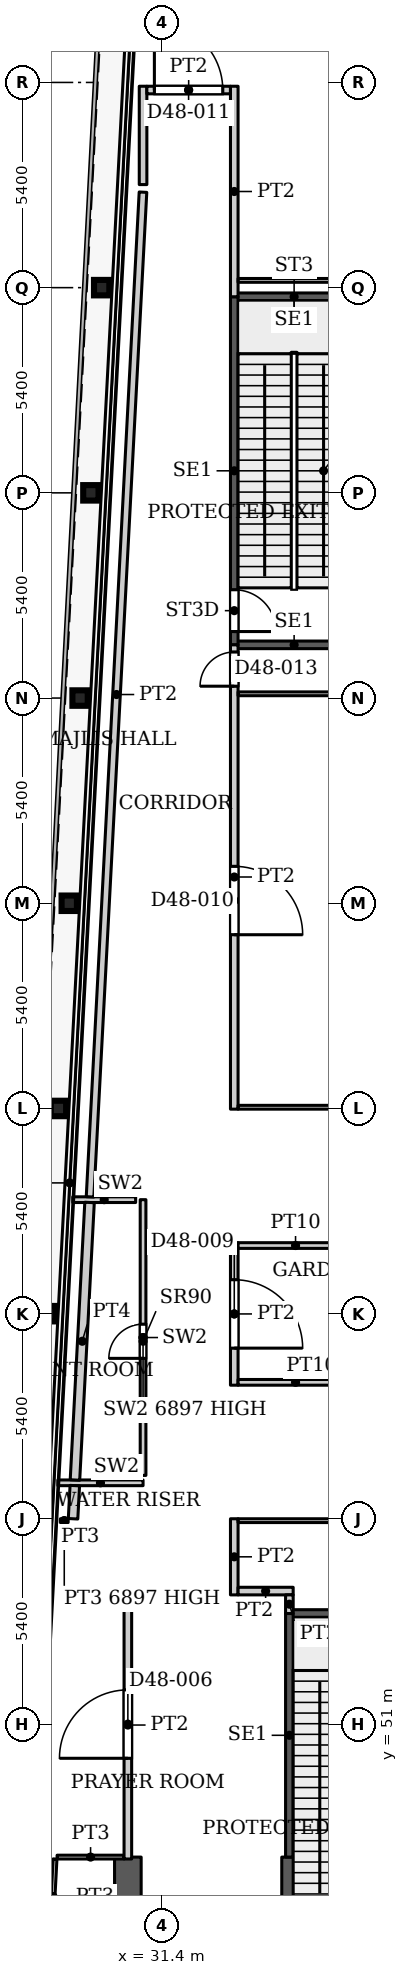
"""IFC4 building model, lengths in metres.
Left out: names, types, materials, properties, quantities, classifications, styles, units other than length and angle.
Written with IfcOpenShell. Run it as: python <this file> out.ifc"""

import sys

from ifc_helpers import new_model, si_unit, direction, frame, frame_2d, origin, origin_2d, place, context, subcontext, project, spatial, rectangle, i_section, extrude, source, transform, mapped, element, fill, save


model = new_model("IFC4")
c1 = context("Model", 3, precision=1e-05, world=origin(), true_north=direction((0.0, 1.0)))
c2 = subcontext(c1, "Body", "Model", "MODEL_VIEW")
j1 = project(units=[si_unit("LENGTHUNIT", "METRE"), si_unit("PLANEANGLEUNIT", "RADIAN")], contexts=[c1])
p1 = place(None, origin())
s1 = spatial("IfcSite", under=j1, at=p1, CompositionType="ELEMENT")
p2 = place(p1, origin())
s2 = spatial("IfcBuilding", under=s1, at=p2, CompositionType="ELEMENT")
p3 = place(p2, frame((0.0, 0.0, 203.3)))
s3 = spatial("IfcBuildingStorey", under=s2, at=p3, CompositionType="ELEMENT", Elevation=203.3)
for number, where, z_axis, x_axis in (
    (1, (28.39, 61.8, 0.0), (0.0, 0.0, 1.0), (1.0, 0.0, 0.0)),
    (2, (28.674, 67.2, 0.0), (0.0, 0.0, 1.0), (1.0, 0.0, 0.0)),
    (3, (28.958, 72.6, 0.0), (0.0, 0.0, 1.0), (1.0, 0.0, 0.0)),
    (4, (29.243, 78.0, 0.0), (0.0, 0.0, 1.0), (1.0, 0.0, 0.0)),
    (5, (29.527, 83.4, 0.0), (0.0, 0.0, 1.0), (1.0, 0.0, 0.0)),
    (6, (29.811, 88.8, 0.0), (0.0, 0.0, 1.0), (1.0, 0.0, 0.0)),
):
    element("IfcColumn", number, at=place(p3, frame(where, z_axis=z_axis, x_axis=x_axis)), inside=s3, PredefinedType="COLUMN", context=c2, shape_type="SweptSolid", body=[
        extrude(i_section(OverallWidth=0.404, OverallDepth=0.407, WebThickness=0.027, FlangeThickness=0.044, FilletRadius=0.012, at=origin_2d()), origin(), (0.0, 0.0, 1.0), 7.8),
    ])
p4 = place(p3, frame((34.75, 29.05, 0.0), z_axis=(0.0, 0.0, 1.0), x_axis=(0.0, 1.0, 0.0)))
e7 = element("IfcWall", 7, at=p4, inside=s3, PredefinedType="SHEAR", context=c2, shape_type="SweptSolid", body=[
    extrude(rectangle(XDim=18.45, YDim=0.4, at=frame_2d((9.225, 0.0))), origin(), (0.0, 0.0, 1.0), 7.8),
])
p5 = place(p4, frame((8.025, 0.0, 0.0)))
e8 = element("IfcOpeningElement", 8, at=p5, cuts=e7, PredefinedType="OPENING", context=c2, shape_type="SweptSolid", body=[
    extrude(rectangle(XDim=1.1, YDim=2.2, at=frame_2d((0.55, 1.1))), frame((0.0, 0.21, 0.0), z_axis=(0.0, -1.0, 0.0), x_axis=(1.0, 0.0, 0.0)), (0.0, 0.0, 1.0), 0.42),
])
p6 = place(p4, frame((10.875, 0.0, 0.0)))
e9 = element("IfcOpeningElement", 9, at=p6, cuts=e7, PredefinedType="OPENING", context=c2, shape_type="SweptSolid", body=[
    extrude(rectangle(XDim=1.1, YDim=2.2, at=frame_2d((0.55, 1.1))), frame((0.0, 0.21, 0.0), z_axis=(0.0, -1.0, 0.0), x_axis=(1.0, 0.0, 0.0)), (0.0, 0.0, 1.0), 0.42),
])
p7 = place(p4, frame((13.725, 0.0, 0.0)))
e10 = element("IfcOpeningElement", 10, at=p7, cuts=e7, PredefinedType="OPENING", context=c2, shape_type="SweptSolid", body=[
    extrude(rectangle(XDim=1.1, YDim=2.2, at=frame_2d((0.55, 1.1))), frame((0.0, 0.21, 0.0), z_axis=(0.0, -1.0, 0.0), x_axis=(1.0, 0.0, 0.0)), (0.0, 0.0, 1.0), 0.42),
])
p8 = place(p4, frame((15.95, 0.0, 0.0)))
e11 = element("IfcOpeningElement", 11, at=p8, cuts=e7, PredefinedType="OPENING", context=c2, shape_type="SweptSolid", body=[
    extrude(rectangle(XDim=1.1, YDim=2.2, at=frame_2d((0.55, 1.1))), frame((0.0, 0.21, 0.0), z_axis=(0.0, -1.0, 0.0), x_axis=(1.0, 0.0, 0.0)), (0.0, 0.0, 1.0), 0.42),
])
p9 = place(p3, frame((30.5, 29.05, 0.0), z_axis=(0.0, 0.0, 1.0), x_axis=(0.0, 1.0, 0.0)))
e12 = element("IfcWall", 12, at=p9, inside=s3, PredefinedType="SHEAR", context=c2, shape_type="SweptSolid", body=[
    extrude(rectangle(XDim=18.45, YDim=0.7, at=frame_2d((9.225, 0.0))), origin(), (0.0, 0.0, 1.0), 7.8),
])
p10 = place(p9, frame((1.34, 0.0, 0.0)))
e13 = element("IfcOpeningElement", 13, at=p10, cuts=e12, PredefinedType="OPENING", context=c2, shape_type="SweptSolid", body=[
    extrude(rectangle(XDim=0.9, YDim=2.2, at=frame_2d((0.45, 1.1))), frame((0.0, 0.36, 0.0), z_axis=(0.0, -1.0, 0.0), x_axis=(1.0, 0.0, 0.0)), (0.0, 0.0, 1.0), 0.72),
])
p11 = place(p9, frame((7.925, 0.0, 0.0)))
e14 = element("IfcOpeningElement", 14, at=p11, cuts=e12, PredefinedType="OPENING", context=c2, shape_type="SweptSolid", body=[
    extrude(rectangle(XDim=0.9, YDim=2.2, at=frame_2d((0.45, 1.1))), frame((0.0, 0.36, 0.0), z_axis=(0.0, -1.0, 0.0), x_axis=(1.0, 0.0, 0.0)), (0.0, 0.0, 1.0), 0.72),
])
p12 = place(p3, frame((34.75, 53.91, 0.0), z_axis=(0.0, 0.0, 1.0), x_axis=(1.0, 0.0, 0.0)))
e15 = element("IfcWall", 15, at=p12, inside=s3, PredefinedType="SHEAR", context=c2, shape_type="SweptSolid", body=[
    extrude(rectangle(XDim=3.15, YDim=0.2, at=frame_2d((1.575, 0.0))), origin(), (0.0, 0.0, 1.0), 7.8),
])
p13 = place(p3, frame((34.75, 47.5, 0.0), z_axis=(0.0, 0.0, 1.0), x_axis=(0.0, 1.0, 0.0)))
e16 = element("IfcWall", 16, at=p13, inside=s3, PredefinedType="SHEAR", context=c2, shape_type="SweptSolid", body=[
    extrude(rectangle(XDim=6.41, YDim=0.2, at=frame_2d((3.205, 0.0))), origin(), (0.0, 0.0, 1.0), 7.8),
])
for number, where, z_axis, x_axis in (
    (17, (33.3, 79.4, 0.0), (0.0, 0.0, 1.0), (1.0, 0.0, 0.0)),
    (18, (33.3, 88.56, 0.0), (0.0, 0.0, 1.0), (1.0, 0.0, 0.0)),
):
    element("IfcWall", number, at=place(p3, frame(where, z_axis=z_axis, x_axis=x_axis)), inside=s3, PredefinedType="SHEAR", context=c2, shape_type="SweptSolid", body=[
        extrude(rectangle(XDim=3.15, YDim=0.2, at=frame_2d((1.575, 0.0))), origin(), (0.0, 0.0, 1.0), 7.8),
    ])
p14 = place(p3, frame((33.3, 79.4, 0.0), z_axis=(0.0, 0.0, 1.0), x_axis=(0.0, 1.0, 0.0)))
e19 = element("IfcWall", 19, at=p14, inside=s3, PredefinedType="SHEAR", context=c2, shape_type="SweptSolid", body=[
    extrude(rectangle(XDim=9.16, YDim=0.2, at=frame_2d((4.58, 0.0))), origin(), (0.0, 0.0, 1.0), 7.8),
])
p15 = place(p14, frame((0.35, 0.0, 0.0)))
e20 = element("IfcOpeningElement", 20, at=p15, cuts=e19, PredefinedType="OPENING", context=c2, shape_type="SweptSolid", body=[
    extrude(rectangle(XDim=1.1, YDim=2.2, at=frame_2d((0.55, 1.1))), frame((0.0, 0.11, 0.0), z_axis=(0.0, -1.0, 0.0), x_axis=(1.0, 0.0, 0.0)), (0.0, 0.0, 1.0), 0.22),
])
p16 = place(p3, frame((28.658, 57.349, 0.0), z_axis=(0.0, 0.0, 1.0), x_axis=(1.0, 0.0, 0.0)))
e21 = element("IfcWall", 21, at=p16, inside=s3, PredefinedType="PARTITIONING", context=c2, shape_type="SweptSolid", body=[
    extrude(rectangle(XDim=2.242, YDim=0.15, at=frame_2d((1.121, 0.0))), origin(), (0.0, 0.0, 1.0), 7.8),
])
p17 = place(p3, frame((30.9, 57.544, 0.0), z_axis=(0.0, 0.0, 1.0), x_axis=(0.0, 1.0, 0.0)))
e22 = element("IfcWall", 22, at=p17, inside=s3, PredefinedType="PARTITIONING", context=c2, shape_type="SweptSolid", body=[
    extrude(rectangle(XDim=7.256, YDim=0.15, at=frame_2d((3.628, 0.0))), origin(), (0.0, 0.0, 1.0), 6.897),
])
p18 = place(p17, frame((3.08, 0.0, 0.0)))
e23 = element("IfcOpeningElement", 23, at=p18, cuts=e22, PredefinedType="OPENING", context=c2, shape_type="SweptSolid", body=[
    extrude(rectangle(XDim=0.9, YDim=2.2, at=frame_2d((0.45, 1.1))), frame((0.0, 0.085, 0.0), z_axis=(0.0, -1.0, 0.0), x_axis=(1.0, 0.0, 0.0)), (0.0, 0.0, 1.0), 0.17),
])
p19 = place(p3, frame((29.05, 64.8, 0.0), z_axis=(0.0, 0.0, 1.0), x_axis=(1.0, 0.0, 0.0)))
e24 = element("IfcWall", 24, at=p19, inside=s3, PredefinedType="PARTITIONING", context=c2, shape_type="SweptSolid", body=[
    extrude(rectangle(XDim=1.655, YDim=0.15, at=frame_2d((0.828, 0.0))), origin(), (0.0, 0.0, 1.0), 7.8),
])
p20 = place(p3, frame((28.48, 45.473, 0.0), z_axis=(0.0, 0.0, 1.0), x_axis=(0.052532943397, 0.998619191613, 0.0)))
e25 = element("IfcWall", 25, at=p20, inside=s3, PredefinedType="PARTITIONING", context=c2, shape_type="SweptSolid", body=[
    extrude(rectangle(XDim=1.98, YDim=0.1, at=frame_2d((0.99, 0.0))), origin(), (0.0, 0.0, 1.0), 7.5),
])
p21 = place(p3, frame((28.638, 47.5, 0.0), z_axis=(0.0, 0.0, 1.0), x_axis=(1.0, 0.0, 0.0)))
e26 = element("IfcWall", 26, at=p21, inside=s3, PredefinedType="PARTITIONING", context=c2, shape_type="SweptSolid", body=[
    extrude(rectangle(XDim=1.762, YDim=0.1, at=frame_2d((0.881, 0.0))), origin(), (0.0, 0.0, 1.0), 7.5),
])
p22 = place(p3, frame((28.724, 56.353, 0.0), z_axis=(0.0, 0.0, 1.0), x_axis=(1.0, 0.0, 0.0)))
e27 = element("IfcWall", 27, at=p22, inside=s3, PredefinedType="PARTITIONING", context=c2, shape_type="SweptSolid", body=[
    extrude(rectangle(XDim=0.205, YDim=0.1, at=frame_2d((0.103, 0.0))), origin(), (0.0, 0.0, 1.0), 6.897),
])
p23 = place(p3, frame((29.058, 56.403, 0.0), z_axis=(0.0, 0.0, 1.0), x_axis=(0.052573510687, 0.998617056721, 0.0)))
e28 = element("IfcWall", 28, at=p23, inside=s3, PredefinedType="PARTITIONING", context=c2, shape_type="SweptSolid", body=[
    extrude(rectangle(XDim=0.873, YDim=0.25, at=frame_2d((0.437, 0.0))), origin(), (0.0, 0.0, 1.0), 7.5),
])
p24 = place(p3, frame((29.108, 57.423, 0.0), z_axis=(0.0, 0.0, 1.0), x_axis=(0.052513275685, 0.99862022605, 0.0)))
e29 = element("IfcWall", 29, at=p24, inside=s3, PredefinedType="PARTITIONING", context=c2, shape_type="SweptSolid", body=[
    extrude(rectangle(XDim=7.313, YDim=0.25, at=frame_2d((3.656, 0.0))), origin(), (0.0, 0.0, 1.0), 7.5),
])
p25 = place(p3, frame((29.505, 64.874, 0.0), z_axis=(0.0, 0.0, 1.0), x_axis=(0.052618850307, 0.998614668725, 0.0)))
e30 = element("IfcWall", 30, at=p25, inside=s3, PredefinedType="PARTITIONING", context=c2, shape_type="SweptSolid", body=[
    extrude(rectangle(XDim=26.475, YDim=0.2, at=frame_2d((13.237, 0.0))), origin(), (0.0, 0.0, 1.0), 7.5),
])
p26 = place(p3, frame((30.5, 47.45, 0.0), z_axis=(0.0, 0.0, 1.0), x_axis=(0.0, 1.0, 0.0)))
e31 = element("IfcWall", 31, at=p26, inside=s3, PredefinedType="PARTITIONING", context=c2, shape_type="SweptSolid", body=[
    extrude(rectangle(XDim=7.05, YDim=0.2, at=frame_2d((3.525, 0.0))), origin(), (0.0, 0.0, 1.0), 7.5),
])
p27 = place(p26, frame((2.65, 0.0, 0.0)))
e32 = element("IfcOpeningElement", 32, at=p27, cuts=e31, PredefinedType="OPENING", context=c2, shape_type="SweptSolid", body=[
    extrude(rectangle(XDim=1.8, YDim=2.1, at=frame_2d((0.9, 1.05))), frame((0.0, 0.11, 0.0), z_axis=(0.0, -1.0, 0.0), x_axis=(1.0, 0.0, 0.0)), (0.0, 0.0, 1.0), 0.22),
])
p28 = place(p3, frame((30.9, 91.512, 0.0), z_axis=(0.0, 0.0, 1.0), x_axis=(0.0, 1.0, 0.0)))
e33 = element("IfcWall", 33, at=p28, inside=s3, PredefinedType="PARTITIONING", context=c2, shape_type="SweptSolid", body=[
    extrude(rectangle(XDim=2.588, YDim=0.2, at=frame_2d((1.294, 0.0))), origin(), (0.0, 0.0, 1.0), 7.5),
])
p29 = place(p3, frame((31.0, 94.0, 0.0), z_axis=(0.0, 0.0, 1.0), x_axis=(1.0, 0.0, 0.0)))
e34 = element("IfcWall", 34, at=p29, inside=s3, PredefinedType="PARTITIONING", context=c2, shape_type="SweptSolid", body=[
    extrude(rectangle(XDim=2.2, YDim=0.2, at=frame_2d((1.1, 0.0))), origin(), (0.0, 0.0, 1.0), 7.5),
])
p30 = place(p29, frame((0.198, 0.0, 0.0)))
e35 = element("IfcOpeningElement", 35, at=p30, cuts=e34, PredefinedType="OPENING", context=c2, shape_type="SweptSolid", body=[
    extrude(rectangle(XDim=1.8, YDim=2.1, at=frame_2d((0.9, 1.05))), frame((0.0, 0.11, 0.0), z_axis=(0.0, -1.0, 0.0), x_axis=(1.0, 0.0, 0.0)), (0.0, 0.0, 1.0), 0.22),
])
p31 = place(p3, frame((33.3, 54.4, 0.0), z_axis=(0.0, 0.0, 1.0), x_axis=(0.0, 1.0, 0.0)))
e36 = element("IfcWall", 36, at=p31, inside=s3, PredefinedType="PARTITIONING", context=c2, shape_type="SweptSolid", body=[
    extrude(rectangle(XDim=2.003, YDim=0.2, at=frame_2d((1.001, 0.0))), origin(), (0.0, 0.0, 1.0), 7.5),
])
p32 = place(p3, frame((33.3, 59.918, 0.0), z_axis=(0.0, 0.0, 1.0), x_axis=(0.0, 1.0, 0.0)))
e37 = element("IfcWall", 37, at=p32, inside=s3, PredefinedType="PARTITIONING", context=c2, shape_type="SweptSolid", body=[
    extrude(rectangle(XDim=3.75, YDim=0.2, at=frame_2d((1.875, 0.0))), origin(), (0.0, 0.0, 1.0), 7.5),
])
p33 = place(p32, frame((0.975, 0.0, 0.0)))
e38 = element("IfcOpeningElement", 38, at=p33, cuts=e37, PredefinedType="OPENING", context=c2, shape_type="SweptSolid", body=[
    extrude(rectangle(XDim=1.8, YDim=2.1, at=frame_2d((0.9, 1.05))), frame((0.0, 0.11, 0.0), z_axis=(0.0, -1.0, 0.0), x_axis=(1.0, 0.0, 0.0)), (0.0, 0.0, 1.0), 0.22),
])
p34 = place(p3, frame((33.3, 67.182, 0.0), z_axis=(0.0, 0.0, 1.0), x_axis=(0.0, 1.0, 0.0)))
e39 = element("IfcWall", 39, at=p34, inside=s3, PredefinedType="PARTITIONING", context=c2, shape_type="SweptSolid", body=[
    extrude(rectangle(XDim=12.218, YDim=0.2, at=frame_2d((6.109, 0.0))), origin(), (0.0, 0.0, 1.0), 7.5),
])
p35 = place(p34, frame((4.59, 0.0, 0.0)))
e40 = element("IfcOpeningElement", 40, at=p35, cuts=e39, PredefinedType="OPENING", context=c2, shape_type="SweptSolid", body=[
    extrude(rectangle(XDim=1.8, YDim=2.1, at=frame_2d((0.9, 1.05))), frame((0.0, 0.11, 0.0), z_axis=(0.0, -1.0, 0.0), x_axis=(1.0, 0.0, 0.0)), (0.0, 0.0, 1.0), 0.22),
])
p36 = place(p34, frame((11.13, 0.0, 0.0)))
e41 = element("IfcOpeningElement", 41, at=p36, cuts=e39, PredefinedType="OPENING", context=c2, shape_type="SweptSolid", body=[
    extrude(rectangle(XDim=0.9, YDim=2.1, at=frame_2d((0.45, 1.05))), frame((0.0, 0.11, 0.0), z_axis=(0.0, -1.0, 0.0), x_axis=(1.0, 0.0, 0.0)), (0.0, 0.0, 1.0), 0.22),
])
p37 = place(p3, frame((33.3, 88.56, 0.0), z_axis=(0.0, 0.0, 1.0), x_axis=(0.0, 1.0, 0.0)))
e42 = element("IfcWall", 42, at=p37, inside=s3, PredefinedType="PARTITIONING", context=c2, shape_type="SweptSolid", body=[
    extrude(rectangle(XDim=5.54, YDim=0.2, at=frame_2d((2.77, 0.0))), origin(), (0.0, 0.0, 1.0), 7.5),
])
p38 = place(p3, frame((33.4, 54.5, 0.0), z_axis=(0.0, 0.0, 1.0), x_axis=(1.0, 0.0, 0.0)))
e43 = element("IfcWall", 43, at=p38, inside=s3, PredefinedType="PARTITIONING", context=c2, shape_type="SweptSolid", body=[
    extrude(rectangle(XDim=1.45, YDim=0.2, at=frame_2d((0.725, 0.0))), origin(), (0.0, 0.0, 1.0), 7.5),
])
p39 = place(p3, frame((33.4, 56.353, 0.0), z_axis=(0.0, 0.0, 1.0), x_axis=(1.0, 0.0, 0.0)))
e44 = element("IfcWall", 44, at=p39, inside=s3, PredefinedType="PARTITIONING", context=c2, shape_type="SweptSolid", body=[
    extrude(rectangle(XDim=13.77, YDim=0.1, at=frame_2d((6.885, 0.0))), origin(), (0.0, 0.0, 1.0), 6.897),
])
p40 = place(p39, frame((5.55, 0.0, 0.0)))
e45 = element("IfcOpeningElement", 45, at=p40, cuts=e44, PredefinedType="OPENING", context=c2, shape_type="SweptSolid", body=[
    extrude(rectangle(XDim=1.0, YDim=2.1, at=frame_2d((0.5, 1.05))), frame((0.0, 0.06, 0.0), z_axis=(0.0, -1.0, 0.0), x_axis=(1.0, 0.0, 0.0)), (0.0, 0.0, 1.0), 0.12),
])
for number, where, z_axis, x_axis in (
    (46, (33.4, 59.993, 0.0), (0.0, 0.0, 1.0), (1.0, 0.0, 0.0)),
    (47, (33.4, 63.593, 0.0), (0.0, 0.0, 1.0), (1.0, 0.0, 0.0)),
):
    element("IfcWall", number, at=place(p3, frame(where, z_axis=z_axis, x_axis=x_axis)), inside=s3, PredefinedType="PARTITIONING", context=c2, shape_type="SweptSolid", body=[
        extrude(rectangle(XDim=3.025, YDim=0.15, at=frame_2d((1.513, 0.0))), origin(), (0.0, 0.0, 1.0), 7.5),
    ])
p41 = place(p3, frame((33.4, 67.232, 0.0), z_axis=(0.0, 0.0, 1.0), x_axis=(1.0, 0.0, 0.0)))
e48 = element("IfcWall", 48, at=p41, inside=s3, PredefinedType="PARTITIONING", context=c2, shape_type="SweptSolid", body=[
    extrude(rectangle(XDim=13.77, YDim=0.1, at=frame_2d((6.885, 0.0))), origin(), (0.0, 0.0, 1.0), 6.897),
])
p42 = place(p3, frame((33.4, 78.112, 0.0), z_axis=(0.0, 0.0, 1.0), x_axis=(1.0, 0.0, 0.0)))
e49 = element("IfcWall", 49, at=p42, inside=s3, PredefinedType="PARTITIONING", context=c2, shape_type="SweptSolid", body=[
    extrude(rectangle(XDim=13.77, YDim=0.1, at=frame_2d((6.885, 0.0))), origin(), (0.0, 0.0, 1.0), 6.897),
])
p43 = place(p42, frame((5.73, 0.0, 0.0)))
e50 = element("IfcOpeningElement", 50, at=p43, cuts=e49, PredefinedType="OPENING", context=c2, shape_type="SweptSolid", body=[
    extrude(rectangle(XDim=1.0, YDim=2.1, at=frame_2d((0.5, 1.05))), frame((0.0, 0.06, 0.0), z_axis=(0.0, -1.0, 0.0), x_axis=(1.0, 0.0, 0.0)), (0.0, 0.0, 1.0), 0.12),
])
p44 = place(p3, frame((33.4, 88.991, 0.0), z_axis=(0.0, 0.0, 1.0), x_axis=(1.0, 0.0, 0.0)))
e51 = element("IfcWall", 51, at=p44, inside=s3, PredefinedType="PARTITIONING", context=c2, shape_type="SweptSolid", body=[
    extrude(rectangle(XDim=13.77, YDim=0.1, at=frame_2d((6.885, 0.0))), origin(), (0.0, 0.0, 1.0), 6.4),
])
p45 = place(p3, frame((34.75, 53.91, 0.0), z_axis=(0.0, 0.0, 1.0), x_axis=(0.0, 1.0, 0.0)))
e52 = element("IfcWall", 52, at=p45, inside=s3, PredefinedType="PARTITIONING", context=c2, shape_type="SweptSolid", body=[
    extrude(rectangle(XDim=0.49, YDim=0.2, at=frame_2d((0.245, 0.0))), origin(), (0.0, 0.0, 1.0), 7.5),
])
m1 = source(origin(), c2, "Body", "SweptSolid", [
    extrude(rectangle(XDim=0.9, YDim=2.2, at=frame_2d((0.45, 1.1))), frame((0.0, 0.025, 0.0), z_axis=(0.0, -1.0, 0.0), x_axis=(1.0, 0.0, 0.0)), (0.0, 0.0, 1.0), 0.05),
])
p46 = place(p18, origin())
e53 = element("IfcDoor", 53, at=p46, inside=s3, OperationType="SINGLE_SWING_LEFT", PredefinedType="DOOR", context=c2, shape_type="MappedRepresentation", body=[
    mapped(m1, transform((0.0, 0.0, 0.0), x_axis=(1.0, 0.0, 0.0), y_axis=(0.0, 1.0, 0.0), z_axis=(0.0, 0.0, 1.0), scale=1.0)),
])
fill(e23, e53)
m2 = source(origin(), c2, "Body", "SweptSolid", [
    extrude(rectangle(XDim=1.1, YDim=2.2, at=frame_2d((0.55, 1.1))), frame((0.0, 0.025, 0.0), z_axis=(0.0, -1.0, 0.0), x_axis=(1.0, 0.0, 0.0)), (0.0, 0.0, 1.0), 0.05),
])
p47 = place(p15, origin())
e54 = element("IfcDoor", 54, at=p47, inside=s3, OperationType="SINGLE_SWING_RIGHT", PredefinedType="DOOR", context=c2, shape_type="MappedRepresentation", body=[
    mapped(m2, transform((0.0, 0.0, 0.0), x_axis=(1.0, 0.0, 0.0), y_axis=(0.0, 1.0, 0.0), z_axis=(0.0, 0.0, 1.0), scale=1.0)),
])
fill(e20, e54)
m3 = source(origin(), c2, "Body", "SweptSolid", [
    extrude(rectangle(XDim=1.8, YDim=2.1, at=frame_2d((0.9, 1.05))), frame((0.0, 0.025, 0.0), z_axis=(0.0, -1.0, 0.0), x_axis=(1.0, 0.0, 0.0)), (0.0, 0.0, 1.0), 0.05),
])
p48 = place(p27, origin())
e55 = element("IfcDoor", 55, at=p48, inside=s3, OperationType="DOUBLE_DOOR_SINGLE_SWING", PredefinedType="DOOR", context=c2, shape_type="MappedRepresentation", body=[
    mapped(m3, transform((0.0, 0.0, 0.0), x_axis=(1.0, 0.0, 0.0), y_axis=(0.0, 1.0, 0.0), z_axis=(0.0, 0.0, 1.0), scale=1.0)),
])
fill(e32, e55)
p49 = place(p33, origin())
e56 = element("IfcDoor", 56, at=p49, inside=s3, OperationType="DOUBLE_DOOR_SINGLE_SWING", PredefinedType="DOOR", context=c2, shape_type="MappedRepresentation", body=[
    mapped(m3, transform((0.0, 0.0, 0.0), x_axis=(1.0, 0.0, 0.0), y_axis=(0.0, 1.0, 0.0), z_axis=(0.0, 0.0, 1.0), scale=1.0)),
])
fill(e38, e56)
p50 = place(p35, origin())
e57 = element("IfcDoor", 57, at=p50, inside=s3, OperationType="DOUBLE_DOOR_SINGLE_SWING", PredefinedType="DOOR", context=c2, shape_type="MappedRepresentation", body=[
    mapped(m3, transform((0.0, 0.0, 0.0), x_axis=(1.0, 0.0, 0.0), y_axis=(0.0, 1.0, 0.0), z_axis=(0.0, 0.0, 1.0), scale=1.0)),
])
fill(e40, e57)
p51 = place(p30, origin())
e58 = element("IfcDoor", 58, at=p51, inside=s3, OperationType="DOUBLE_DOOR_SINGLE_SWING", PredefinedType="DOOR", context=c2, shape_type="MappedRepresentation", body=[
    mapped(m3, transform((0.0, 0.0, 0.0), x_axis=(1.0, 0.0, 0.0), y_axis=(0.0, 1.0, 0.0), z_axis=(0.0, 0.0, 1.0), scale=1.0)),
])
fill(e35, e58)
m4 = source(origin(), c2, "Body", "SweptSolid", [
    extrude(rectangle(XDim=0.9, YDim=2.1, at=frame_2d((0.45, 1.05))), frame((0.0, 0.025, 0.0), z_axis=(0.0, -1.0, 0.0), x_axis=(1.0, 0.0, 0.0)), (0.0, 0.0, 1.0), 0.05),
])
p52 = place(p36, origin())
e59 = element("IfcDoor", 59, at=p52, inside=s3, OperationType="SINGLE_SWING_LEFT", PredefinedType="DOOR", context=c2, shape_type="MappedRepresentation", body=[
    mapped(m4, transform((0.0, 0.0, 0.0), x_axis=(1.0, 0.0, 0.0), y_axis=(0.0, 1.0, 0.0), z_axis=(0.0, 0.0, 1.0), scale=1.0)),
])
fill(e41, e59)
save(model, sys.argv[1])
